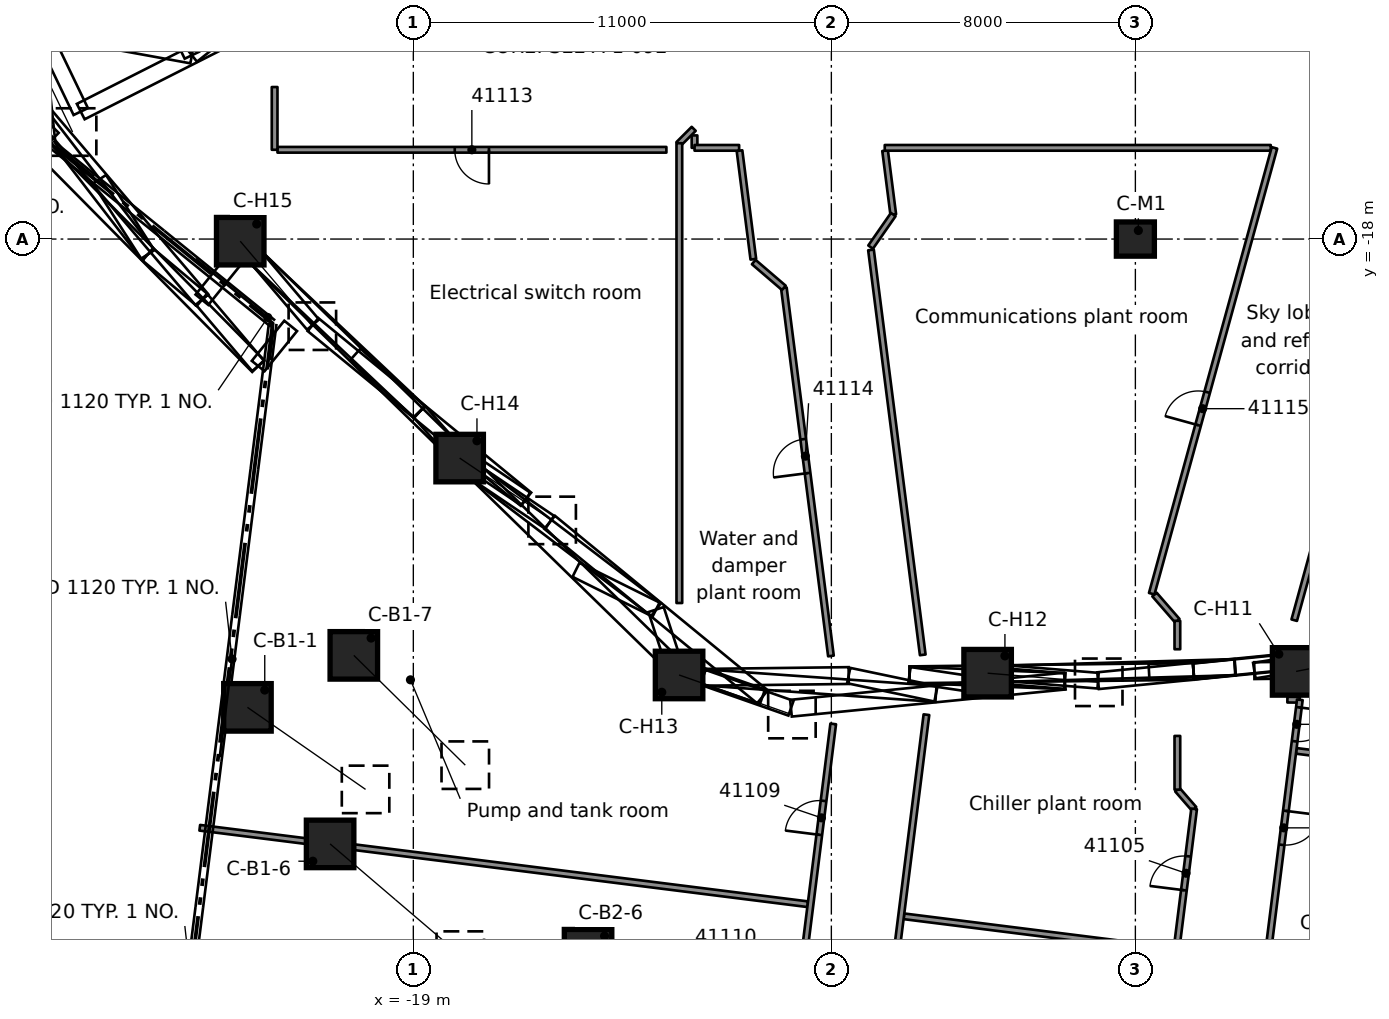
"""IFC4 building model, lengths in metres.
Left out: names, types, materials, properties, quantities, classifications, styles, units other than length and angle.
Written with IfcOpenShell. Run it as: python <this file> out.ifc"""

import sys

from ifc_helpers import new_model, si_unit, direction, frame, frame_2d, origin, origin_2d, place, context, subcontext, project, spatial, rectangle, extrude, element, fill, save


model = new_model("IFC4")
c1 = context("Model", 3, precision=1e-05, world=origin(), true_north=direction((0.0, 1.0)))
c2 = subcontext(c1, "Body", "Model", "MODEL_VIEW")
j1 = project(units=[si_unit("LENGTHUNIT", "METRE"), si_unit("PLANEANGLEUNIT", "RADIAN")], contexts=[c1])
p1 = place(None, origin())
s1 = spatial("IfcSite", under=j1, at=p1, CompositionType="ELEMENT")
p2 = place(p1, origin())
s2 = spatial("IfcBuilding", under=s1, at=p2, CompositionType="ELEMENT")
p3 = place(p2, frame((0.0, 0.0, 206.1)))
s3 = spatial("IfcBuildingStorey", under=s2, at=p3, CompositionType="ELEMENT", Elevation=206.1)
p4 = place(p3, frame((-23.365, -30.322, 0.46), z_axis=(0.604547981871, -0.419954265804, 0.676875285594), x_axis=(0.570514289854, 0.821287674979, 0.0)))
e1 = element("IfcColumn", 1, at=p4, inside=s3, PredefinedType="COLUMN", context=c2, shape_type="SweptSolid", body=[
    extrude(rectangle(XDim=1.25, YDim=1.25, at=origin_2d()), origin(), (0.0, 0.0, 1.0), 5.141),
])
p5 = place(p3, frame((-21.19, -33.915, 0.499), z_axis=(0.60682574595, -0.518264559624, 0.602631197574), x_axis=(0.649438201848, 0.76041437518, 0.0)))
e2 = element("IfcColumn", 2, at=p5, inside=s3, PredefinedType="COLUMN", context=c2, shape_type="SweptSolid", body=[
    extrude(rectangle(XDim=1.25, YDim=1.25, at=origin_2d()), origin(), (0.0, 0.0, 1.0), 5.646),
])
p6 = place(p3, frame((-20.566, -28.954, 0.479), z_axis=(0.546625765271, -0.538435251848, 0.641317201009), x_axis=(0.701749238888, 0.712424035052, 0.0)))
e3 = element("IfcColumn", 3, at=p6, inside=s3, PredefinedType="COLUMN", context=c2, shape_type="SweptSolid", body=[
    extrude(rectangle(XDim=1.25, YDim=1.25, at=origin_2d()), origin(), (0.0, 0.0, 1.0), 5.365),
])
p7 = place(p3, frame((-14.402, -36.791, 0.489), z_axis=(0.668536196843, -0.40762020421, 0.622016979375), x_axis=(0.520585249555, 0.853809696564, 0.0)))
e4 = element("IfcColumn", 4, at=p7, inside=s3, PredefinedType="COLUMN", context=c2, shape_type="SweptSolid", body=[
    extrude(rectangle(XDim=1.25, YDim=1.25, at=origin_2d()), origin(), (0.0, 0.0, 1.0), 5.5),
])
p8 = place(p3, frame((4.23, -29.376, 0.394), z_axis=(0.618915614767, 0.120561844769, 0.776149665582), x_axis=(-0.191201472119, 0.981550812266, 0.0)))
e5 = element("IfcColumn", 5, at=p8, inside=s3, PredefinedType="COLUMN", context=c2, shape_type="SweptSolid", body=[
    extrude(rectangle(XDim=1.25, YDim=1.25, at=origin_2d()), origin(), (0.0, 0.0, 1.0), 4.654),
])
p9 = place(p3, frame((-3.888, -29.423, 0.394), z_axis=(0.628357788529, -0.051576127766, 0.776212852663), x_axis=(0.081805717627, 0.99664829532, 0.0)))
e6 = element("IfcColumn", 6, at=p9, inside=s3, PredefinedType="COLUMN", context=c2, shape_type="SweptSolid", body=[
    extrude(rectangle(XDim=1.25, YDim=1.25, at=origin_2d()), origin(), (0.0, 0.0, 1.0), 4.653),
])
p10 = place(p3, frame((-12.007, -29.47, 0.413), z_axis=(0.623513084536, -0.21882689292, 0.750563937548), x_axis=(0.331155585117, 0.943576164623, 0.0)))
e7 = element("IfcColumn", 7, at=p10, inside=s3, PredefinedType="COLUMN", context=c2, shape_type="SweptSolid", body=[
    extrude(rectangle(XDim=1.25, YDim=1.25, at=origin_2d()), origin(), (0.0, 0.0, 1.0), 4.762),
])
p11 = place(p3, frame((-17.781, -23.763, 0.394), z_axis=(0.523026204983, -0.352426283358, 0.776040787394), x_axis=(0.558801233735, 0.829301622557, 0.0)))
e8 = element("IfcColumn", 8, at=p11, inside=s3, PredefinedType="COLUMN", context=c2, shape_type="SweptSolid", body=[
    extrude(rectangle(XDim=1.25, YDim=1.25, at=origin_2d()), origin(), (0.0, 0.0, 1.0), 4.654),
])
p12 = place(p3, frame((-23.555, -18.056, 0.394), z_axis=(0.407867599836, -0.480742322781, 0.776228600408), x_axis=(0.762536504129, 0.646945190778, 0.0)))
e9 = element("IfcColumn", 9, at=p12, inside=s3, PredefinedType="COLUMN", context=c2, shape_type="SweptSolid", body=[
    extrude(rectangle(XDim=1.25, YDim=1.25, at=origin_2d()), origin(), (0.0, 0.0, 1.0), 4.653),
])
p13 = place(p3, frame((-29.329, -12.349, 0.413), z_axis=(0.286274556016, -0.5954182598, 0.750682339258), x_axis=(0.901243098623, 0.433313832209, 0.0)))
e10 = element("IfcColumn", 10, at=p13, inside=s3, PredefinedType="COLUMN", context=c2, shape_type="SweptSolid", body=[
    extrude(rectangle(XDim=1.25, YDim=1.25, at=origin_2d()), origin(), (0.0, 0.0, 1.0), 4.761),
])
p14 = place(p3, frame((0.0, -18.0, 0.0), z_axis=(0.0, 0.0, 1.0), x_axis=(1.0, 0.0, 0.0)))
e11 = element("IfcColumn", 11, at=p14, inside=s3, PredefinedType="COLUMN", context=c2, shape_type="SweptSolid", body=[
    extrude(rectangle(XDim=1.0, YDim=0.9, at=origin_2d()), origin(), (0.0, 0.0, 1.0), 4.4),
])
p15 = place(p3, frame((-11.601, -15.273, 0.0), z_axis=(0.0, 0.0, 1.0), x_axis=(0.002985061327, -0.999995544695, 0.0)))
e12 = element("IfcWall", 12, at=p15, inside=s3, PredefinedType="PARTITIONING", context=c2, shape_type="SweptSolid", body=[
    extrude(rectangle(XDim=0.327, YDim=0.15, at=frame_2d((0.164, 0.0))), origin(), (0.0, 0.0, 1.0), 3.98),
])
p16 = place(p3, frame((-10.417, -15.674, 0.0), z_axis=(0.0, 0.0, 1.0), x_axis=(0.126392298822, -0.991980335893, 0.0)))
e13 = element("IfcWall", 13, at=p16, inside=s3, PredefinedType="PARTITIONING", context=c2, shape_type="SweptSolid", body=[
    extrude(rectangle(XDim=2.88, YDim=0.15, at=frame_2d((1.44, 0.0))), origin(), (0.0, 0.0, 1.0), 3.98),
])
p17 = place(p3, frame((-8.011, -28.97, 0.0), z_axis=(0.0, 0.0, 1.0), x_axis=(-0.126883648169, 0.991917607378, 0.0)))
e14 = element("IfcWall", 14, at=p17, inside=s3, PredefinedType="PARTITIONING", context=c2, shape_type="SweptSolid", body=[
    extrude(rectangle(XDim=9.765, YDim=0.15, at=frame_2d((4.882, 0.0))), origin(), (0.0, 0.0, 1.0), 3.98),
])
p18 = place(p17, frame((4.85, 0.0, 0.0)))
e15 = element("IfcOpeningElement", 15, at=p18, cuts=e14, PredefinedType="OPENING", context=c2, shape_type="SweptSolid", body=[
    extrude(rectangle(XDim=0.9, YDim=2.1, at=frame_2d((0.45, 1.05))), frame((0.0, 0.085, 0.0), z_axis=(0.0, -1.0, 0.0), x_axis=(1.0, 0.0, 0.0)), (0.0, 0.0, 1.0), 0.17),
])
p19 = place(p3, frame((-6.957, -18.286, 0.0), z_axis=(0.0, 0.0, 1.0), x_axis=(0.126800802757, -0.991928201242, 0.0)))
e16 = element("IfcWall", 16, at=p19, inside=s3, PredefinedType="PARTITIONING", context=c2, shape_type="SweptSolid", body=[
    extrude(rectangle(XDim=10.742, YDim=0.15, at=frame_2d((5.371, 0.0))), origin(), (0.0, 0.0, 1.0), 3.98),
])
p20 = place(p3, frame((-6.586, -15.674, 0.0), z_axis=(0.0, 0.0, 1.0), x_axis=(0.126782694837, -0.991930515858, 0.0)))
e17 = element("IfcWall", 17, at=p20, inside=s3, PredefinedType="PARTITIONING", context=c2, shape_type="SweptSolid", body=[
    extrude(rectangle(XDim=1.695, YDim=0.15, at=frame_2d((0.847, 0.0))), origin(), (0.0, 0.0, 1.0), 3.98),
])
p21 = place(p3, frame((0.502, -27.352, 0.0), z_axis=(0.0, 0.0, 1.0), x_axis=(0.656507674583, -0.754319344319, 0.0)))
e18 = element("IfcWall", 18, at=p21, inside=s3, PredefinedType="PARTITIONING", context=c2, shape_type="SweptSolid", body=[
    extrude(rectangle(XDim=0.918, YDim=0.15, at=frame_2d((0.459, 0.0))), origin(), (0.0, 0.0, 1.0), 3.98),
])
p22 = place(p3, frame((-24.62, -33.49, 0.0), z_axis=(0.0, 0.0, 1.0), x_axis=(0.992184418995, -0.124780121428, 0.0)))
e19 = element("IfcWall", 19, at=p22, inside=s3, PredefinedType="PARTITIONING", context=c2, shape_type="SweptSolid", body=[
    extrude(rectangle(XDim=16.124, YDim=0.15, at=frame_2d((8.062, 0.0))), origin(), (0.0, 0.0, 1.0), 3.98),
])
p23 = place(p3, frame((-6.091, -35.82, 0.0), z_axis=(0.0, 0.0, 1.0), x_axis=(0.992189898708, -0.124736541969, 0.0)))
e20 = element("IfcWall", 20, at=p23, inside=s3, PredefinedType="PARTITIONING", context=c2, shape_type="SweptSolid", body=[
    extrude(rectangle(XDim=7.15, YDim=0.15, at=frame_2d((3.575, 0.0))), origin(), (0.0, 0.0, 1.0), 3.98),
])
p24 = place(p3, frame((4.232, -31.467, 0.0), z_axis=(0.0, 0.0, 1.0), x_axis=(0.992187839052, -0.124752923961, 0.0)))
e21 = element("IfcWall", 21, at=p24, inside=s3, PredefinedType="PARTITIONING", context=c2, shape_type="SweptSolid", body=[
    extrude(rectangle(XDim=15.271, YDim=0.15, at=frame_2d((7.635, 0.0))), origin(), (0.0, 0.0, 1.0), 3.98),
])
p25 = place(p3, frame((1.105, -32.488, 0.0), z_axis=(0.0, 0.0, 1.0), x_axis=(0.657060992412, -0.753837417651, 0.0)))
e22 = element("IfcWall", 22, at=p25, inside=s3, PredefinedType="PARTITIONING", context=c2, shape_type="SweptSolid", body=[
    extrude(rectangle(XDim=0.671, YDim=0.15, at=frame_2d((0.335, 0.0))), origin(), (0.0, 0.0, 1.0), 3.98),
])
p26 = place(p3, frame((4.0, -30.119, 0.0), z_axis=(0.0, 0.0, 1.0), x_axis=(0.999918931432, -0.012733050063, 0.0)))
e23 = element("IfcWall", 23, at=p26, inside=s3, PredefinedType="PARTITIONING", context=c2, shape_type="SweptSolid", body=[
    extrude(rectangle(XDim=0.326, YDim=0.15, at=frame_2d((0.163, 0.0))), origin(), (0.0, 0.0, 1.0), 3.98),
])
p27 = place(p3, frame((-12.341, -15.651, 0.0), z_axis=(0.0, 0.0, 1.0), x_axis=(-1.0, 0.0, 0.0)))
e24 = element("IfcWall", 24, at=p27, inside=s3, PredefinedType="PARTITIONING", context=c2, shape_type="SweptSolid", body=[
    extrude(rectangle(XDim=10.234, YDim=0.15, at=frame_2d((5.117, 0.0))), origin(), (0.0, 0.0, 1.0), 3.98),
])
p28 = place(p27, frame((4.669, 0.0, 0.0)))
e25 = element("IfcOpeningElement", 25, at=p28, cuts=e24, PredefinedType="OPENING", context=c2, shape_type="SweptSolid", body=[
    extrude(rectangle(XDim=0.9, YDim=2.1, at=frame_2d((0.45, 1.05))), frame((0.0, 0.085, 0.0), z_axis=(0.0, -1.0, 0.0), x_axis=(1.0, 0.0, 0.0)), (0.0, 0.0, 1.0), 0.17),
])
p29 = place(p3, frame((-11.6, -15.6, 0.0), z_axis=(0.0, 0.0, 1.0), x_axis=(1.0, 0.0, 0.0)))
e26 = element("IfcWall", 26, at=p29, inside=s3, PredefinedType="PARTITIONING", context=c2, shape_type="SweptSolid", body=[
    extrude(rectangle(XDim=1.173, YDim=0.15, at=frame_2d((0.586, 0.0))), origin(), (0.0, 0.0, 1.0), 3.98),
])
p30 = place(p3, frame((-6.595, -15.6, 0.0), z_axis=(0.0, 0.0, 1.0), x_axis=(1.0, 0.0, 0.0)))
e27 = element("IfcWall", 27, at=p30, inside=s3, PredefinedType="PARTITIONING", context=c2, shape_type="SweptSolid", body=[
    extrude(rectangle(XDim=10.157, YDim=0.15, at=frame_2d((5.079, 0.0))), origin(), (0.0, 0.0, 1.0), 3.98),
])
p31 = place(p3, frame((-10.042, -18.605, 0.0), z_axis=(0.0, 0.0, 1.0), x_axis=(0.759207039974, -0.65084919179, 0.0)))
e28 = element("IfcWall", 28, at=p31, inside=s3, PredefinedType="PARTITIONING", context=c2, shape_type="SweptSolid", body=[
    extrude(rectangle(XDim=1.043, YDim=0.15, at=frame_2d((0.521, 0.0))), origin(), (0.0, 0.0, 1.0), 3.98),
])
p32 = place(p3, frame((-6.967, -18.212, 0.0), z_axis=(0.0, 0.0, 1.0), x_axis=(0.570947979782, 0.820986238851, 0.0)))
e29 = element("IfcWall", 29, at=p32, inside=s3, PredefinedType="PARTITIONING", context=c2, shape_type="SweptSolid", body=[
    extrude(rectangle(XDim=1.044, YDim=0.15, at=frame_2d((0.522, 0.0))), origin(), (0.0, 0.0, 1.0), 3.98),
])
p33 = place(p3, frame((-12.025, -15.503, 0.0), z_axis=(0.0, 0.0, 1.0), x_axis=(0.707106781187, 0.707106781187, 0.0)))
e30 = element("IfcWall", 30, at=p33, inside=s3, PredefinedType="PARTITIONING", context=c2, shape_type="SweptSolid", body=[
    extrude(rectangle(XDim=0.57, YDim=0.15, at=frame_2d((0.285, 0.0))), origin(), (0.0, 0.0, 1.0), 3.98),
])
p34 = place(p3, frame((7.603, -15.603, 0.0), z_axis=(0.0, 0.0, 1.0), x_axis=(-0.265604225534, -0.964082151779, 0.0)))
e31 = element("IfcWall", 31, at=p34, inside=s3, PredefinedType="PARTITIONING", context=c2, shape_type="SweptSolid", body=[
    extrude(rectangle(XDim=12.888, YDim=0.15, at=frame_2d((6.444, 0.0))), origin(), (0.0, 0.0, 1.0), 3.98),
])
p35 = place(p34, frame((7.607, 0.0, 0.0)))
e32 = element("IfcOpeningElement", 32, at=p35, cuts=e31, PredefinedType="OPENING", context=c2, shape_type="SweptSolid", body=[
    extrude(rectangle(XDim=0.9, YDim=2.1, at=frame_2d((0.45, 1.05))), frame((0.0, 0.085, 0.0), z_axis=(0.0, -1.0, 0.0), x_axis=(1.0, 0.0, 0.0)), (0.0, 0.0, 1.0), 0.17),
])
p36 = place(p3, frame((0.43, -27.332, 0.0), z_axis=(0.0, 0.0, 1.0), x_axis=(0.265459601419, 0.964121983991, 0.0)))
e33 = element("IfcWall", 33, at=p36, inside=s3, PredefinedType="PARTITIONING", context=c2, shape_type="SweptSolid", body=[
    extrude(rectangle(XDim=12.167, YDim=0.15, at=frame_2d((6.084, 0.0))), origin(), (0.0, 0.0, 1.0), 3.98),
])
p37 = place(p36, frame((4.6, 0.0, 0.0)))
e34 = element("IfcOpeningElement", 34, at=p37, cuts=e33, PredefinedType="OPENING", context=c2, shape_type="SweptSolid", body=[
    extrude(rectangle(XDim=0.9, YDim=2.1, at=frame_2d((0.45, 1.05))), frame((0.0, 0.085, 0.0), z_axis=(0.0, -1.0, 0.0), x_axis=(1.0, 0.0, 0.0)), (0.0, 0.0, 1.0), 0.17),
])
p38 = place(p3, frame((4.328, -30.123, 0.0), z_axis=(0.0, 0.0, 1.0), x_axis=(-0.124803349917, -0.992181497434, 0.0)))
e35 = element("IfcWall", 35, at=p38, inside=s3, PredefinedType="PARTITIONING", context=c2, shape_type="SweptSolid", body=[
    extrude(rectangle(XDim=26.153, YDim=0.15, at=frame_2d((13.076, 0.0))), origin(), (0.0, 0.0, 1.0), 3.98),
])
p39 = place(p38, frame((2.946, 0.0, 0.0)))
e36 = element("IfcOpeningElement", 36, at=p39, cuts=e35, PredefinedType="OPENING", context=c2, shape_type="SweptSolid", body=[
    extrude(rectangle(XDim=0.9, YDim=2.1, at=frame_2d((0.45, 1.05))), frame((0.0, 0.085, 0.0), z_axis=(0.0, -1.0, 0.0), x_axis=(1.0, 0.0, 0.0)), (0.0, 0.0, 1.0), 0.17),
])
p40 = place(p38, frame((9.803, 0.0, 0.0)))
e37 = element("IfcOpeningElement", 37, at=p40, cuts=e35, PredefinedType="OPENING", context=c2, shape_type="SweptSolid", body=[
    extrude(rectangle(XDim=0.9, YDim=2.1, at=frame_2d((0.45, 1.05))), frame((0.0, 0.085, 0.0), z_axis=(0.0, -1.0, 0.0), x_axis=(1.0, 0.0, 0.0)), (0.0, 0.0, 1.0), 0.17),
])
p41 = place(p38, frame((16.102, 0.0, 0.0)))
e38 = element("IfcOpeningElement", 38, at=p41, cuts=e35, PredefinedType="OPENING", context=c2, shape_type="SweptSolid", body=[
    extrude(rectangle(XDim=0.9, YDim=2.1, at=frame_2d((0.45, 1.05))), frame((0.0, 0.085, 0.0), z_axis=(0.0, -1.0, 0.0), x_axis=(1.0, 0.0, 0.0)), (0.0, 0.0, 1.0), 0.17),
])
p42 = place(p38, frame((23.052, 0.0, 0.0)))
e39 = element("IfcOpeningElement", 39, at=p42, cuts=e35, PredefinedType="OPENING", context=c2, shape_type="SweptSolid", body=[
    extrude(rectangle(XDim=0.9, YDim=2.1, at=frame_2d((0.45, 1.05))), frame((0.0, 0.085, 0.0), z_axis=(0.0, -1.0, 0.0), x_axis=(1.0, 0.0, 0.0)), (0.0, 0.0, 1.0), 0.17),
])
p43 = place(p38, frame((0.2, 0.0, 0.0)))
e40 = element("IfcOpeningElement", 40, at=p43, cuts=e35, PredefinedType="OPENING", context=c2, shape_type="SweptSolid", body=[
    extrude(rectangle(XDim=0.9, YDim=2.1, at=frame_2d((0.45, 1.05))), frame((0.0, 0.085, 0.0), z_axis=(0.0, -1.0, 0.0), x_axis=(1.0, 0.0, 0.0)), (0.0, 0.0, 1.0), 0.17),
])
p44 = place(p3, frame((-0.668, -50.6, 0.0), z_axis=(0.0, 0.0, 1.0), x_axis=(0.124761144716, 0.99218680538, 0.0)))
e41 = element("IfcWall", 41, at=p44, inside=s3, PredefinedType="PARTITIONING", context=c2, shape_type="SweptSolid", body=[
    extrude(rectangle(XDim=17.745, YDim=0.15, at=frame_2d((8.873, 0.0))), origin(), (0.0, 0.0, 1.0), 3.98),
])
p45 = place(p44, frame((15.588, 0.0, 0.0)))
e42 = element("IfcOpeningElement", 42, at=p45, cuts=e41, PredefinedType="OPENING", context=c2, shape_type="SweptSolid", body=[
    extrude(rectangle(XDim=0.9, YDim=2.1, at=frame_2d((0.45, 1.05))), frame((0.0, 0.085, 0.0), z_axis=(0.0, -1.0, 0.0), x_axis=(1.0, 0.0, 0.0)), (0.0, 0.0, 1.0), 0.17),
])
p46 = place(p44, frame((3.85, 0.0, 0.0)))
e43 = element("IfcOpeningElement", 43, at=p46, cuts=e41, PredefinedType="OPENING", context=c2, shape_type="SweptSolid", body=[
    extrude(rectangle(XDim=0.9, YDim=2.1, at=frame_2d((0.45, 1.05))), frame((0.0, 0.085, 0.0), z_axis=(0.0, -1.0, 0.0), x_axis=(1.0, 0.0, 0.0)), (0.0, 0.0, 1.0), 0.17),
])
p47 = place(p3, frame((-5.498, -30.515, 0.0), z_axis=(0.0, 0.0, 1.0), x_axis=(-0.12483829345, -0.992177101373, 0.0)))
e44 = element("IfcWall", 44, at=p47, inside=s3, PredefinedType="PARTITIONING", context=c2, shape_type="SweptSolid", body=[
    extrude(rectangle(XDim=21.837, YDim=0.15, at=frame_2d((10.918, 0.0))), origin(), (0.0, 0.0, 1.0), 3.98),
])
p48 = place(p47, frame((8.188, 0.0, 0.0)))
e45 = element("IfcOpeningElement", 45, at=p48, cuts=e44, PredefinedType="OPENING", context=c2, shape_type="SweptSolid", body=[
    extrude(rectangle(XDim=0.9, YDim=2.1, at=frame_2d((0.45, 1.05))), frame((0.0, 0.085, 0.0), z_axis=(0.0, -1.0, 0.0), x_axis=(1.0, 0.0, 0.0)), (0.0, 0.0, 1.0), 0.17),
])
p49 = place(p47, frame((20.187, 0.0, 0.0)))
e46 = element("IfcOpeningElement", 46, at=p49, cuts=e44, PredefinedType="OPENING", context=c2, shape_type="SweptSolid", body=[
    extrude(rectangle(XDim=0.9, YDim=2.1, at=frame_2d((0.45, 1.05))), frame((0.0, 0.085, 0.0), z_axis=(0.0, -1.0, 0.0), x_axis=(1.0, 0.0, 0.0)), (0.0, 0.0, 1.0), 0.17),
])
p50 = place(p3, frame((-10.294, -49.402, 0.0), z_axis=(0.0, 0.0, 1.0), x_axis=(0.124690335959, 0.992195706561, 0.0)))
e47 = element("IfcWall", 47, at=p50, inside=s3, PredefinedType="PARTITIONING", context=c2, shape_type="SweptSolid", body=[
    extrude(rectangle(XDim=18.791, YDim=0.15, at=frame_2d((9.396, 0.0))), origin(), (0.0, 0.0, 1.0), 3.98),
])
p51 = place(p50, frame((15.85, 0.0, 0.0)))
e48 = element("IfcOpeningElement", 48, at=p51, cuts=e47, PredefinedType="OPENING", context=c2, shape_type="SweptSolid", body=[
    extrude(rectangle(XDim=0.9, YDim=2.1, at=frame_2d((0.45, 1.05))), frame((0.0, 0.085, 0.0), z_axis=(0.0, -1.0, 0.0), x_axis=(1.0, 0.0, 0.0)), (0.0, 0.0, 1.0), 0.17),
])
p52 = place(p50, frame((11.05, 0.0, 0.0)))
e49 = element("IfcOpeningElement", 49, at=p52, cuts=e47, PredefinedType="OPENING", context=c2, shape_type="SweptSolid", body=[
    extrude(rectangle(XDim=0.9, YDim=2.1, at=frame_2d((0.45, 1.05))), frame((0.0, 0.085, 0.0), z_axis=(0.0, -1.0, 0.0), x_axis=(1.0, 0.0, 0.0)), (0.0, 0.0, 1.0), 0.17),
])
p53 = place(p50, frame((3.85, 0.0, 0.0)))
e50 = element("IfcOpeningElement", 50, at=p53, cuts=e47, PredefinedType="OPENING", context=c2, shape_type="SweptSolid", body=[
    extrude(rectangle(XDim=0.9, YDim=2.1, at=frame_2d((0.45, 1.05))), frame((0.0, 0.085, 0.0), z_axis=(0.0, -1.0, 0.0), x_axis=(1.0, 0.0, 0.0)), (0.0, 0.0, 1.0), 0.17),
])
p54 = place(p3, frame((1.105, -32.488, 0.0), z_axis=(0.0, 0.0, 1.0), x_axis=(0.0, 1.0, 0.0)))
e51 = element("IfcWall", 51, at=p54, inside=s3, PredefinedType="PARTITIONING", context=c2, shape_type="SweptSolid", body=[
    extrude(rectangle(XDim=1.414, YDim=0.15, at=frame_2d((0.707, 0.0))), origin(), (0.0, 0.0, 1.0), 3.98),
])
p55 = place(p3, frame((1.105, -28.793, 0.0), z_axis=(0.0, 0.0, 1.0), x_axis=(0.0, 1.0, 0.0)))
e52 = element("IfcWall", 52, at=p55, inside=s3, PredefinedType="PARTITIONING", context=c2, shape_type="SweptSolid", body=[
    extrude(rectangle(XDim=0.748, YDim=0.15, at=frame_2d((0.374, 0.0))), origin(), (0.0, 0.0, 1.0), 3.98),
])
p56 = place(p3, frame((-12.0, -27.577, 0.0), z_axis=(0.0, 0.0, 1.0), x_axis=(0.0, 1.0, 0.0)))
e53 = element("IfcWall", 53, at=p56, inside=s3, PredefinedType="PARTITIONING", context=c2, shape_type="SweptSolid", body=[
    extrude(rectangle(XDim=12.099, YDim=0.15, at=frame_2d((6.049, 0.0))), origin(), (0.0, 0.0, 1.0), 3.98),
])
p57 = place(p3, frame((-22.65, -15.651, 0.0), z_axis=(0.0, 0.0, 1.0), x_axis=(0.0, 1.0, 0.0)))
e54 = element("IfcWall", 54, at=p57, inside=s3, PredefinedType="PARTITIONING", context=c2, shape_type="SweptSolid", body=[
    extrude(rectangle(XDim=1.651, YDim=0.15, at=frame_2d((0.825, 0.0))), origin(), (0.0, 0.0, 1.0), 3.98),
])
p58 = place(p39, origin())
e55 = element("IfcDoor", 55, at=p58, inside=s3, OperationType="SINGLE_SWING_LEFT", PredefinedType="DOOR", context=c2, shape_type="SweptSolid", body=[
    extrude(rectangle(XDim=0.9, YDim=2.1, at=frame_2d((0.45, 1.05))), frame((0.0, 0.025, 0.0), z_axis=(0.0, -1.0, 0.0), x_axis=(1.0, 0.0, 0.0)), (0.0, 0.0, 1.0), 0.05),
])
fill(e36, e55)
p59 = place(p45, origin())
e56 = element("IfcDoor", 56, at=p59, inside=s3, OperationType="SINGLE_SWING_RIGHT", PredefinedType="DOOR", context=c2, shape_type="SweptSolid", body=[
    extrude(rectangle(XDim=0.9, YDim=2.1, at=frame_2d((0.45, 1.05))), frame((0.0, 0.025, 0.0), z_axis=(0.0, -1.0, 0.0), x_axis=(1.0, 0.0, 0.0)), (0.0, 0.0, 1.0), 0.05),
])
fill(e42, e56)
p60 = place(p51, origin())
e57 = element("IfcDoor", 57, at=p60, inside=s3, OperationType="SINGLE_SWING_RIGHT", PredefinedType="DOOR", context=c2, shape_type="SweptSolid", body=[
    extrude(rectangle(XDim=0.9, YDim=2.1, at=frame_2d((0.45, 1.05))), frame((0.0, 0.025, 0.0), z_axis=(0.0, -1.0, 0.0), x_axis=(1.0, 0.0, 0.0)), (0.0, 0.0, 1.0), 0.05),
])
fill(e48, e57)
p61 = place(p28, origin())
e58 = element("IfcDoor", 58, at=p61, inside=s3, OperationType="SINGLE_SWING_RIGHT", PredefinedType="DOOR", context=c2, shape_type="SweptSolid", body=[
    extrude(rectangle(XDim=0.9, YDim=2.1, at=frame_2d((0.45, 1.05))), frame((0.0, 0.025, 0.0), z_axis=(0.0, -1.0, 0.0), x_axis=(1.0, 0.0, 0.0)), (0.0, 0.0, 1.0), 0.05),
])
fill(e25, e58)
p62 = place(p18, origin())
e59 = element("IfcDoor", 59, at=p62, inside=s3, OperationType="SINGLE_SWING_RIGHT", PredefinedType="DOOR", context=c2, shape_type="SweptSolid", body=[
    extrude(rectangle(XDim=0.9, YDim=2.1, at=frame_2d((0.45, 1.05))), frame((0.0, 0.025, 0.0), z_axis=(0.0, -1.0, 0.0), x_axis=(1.0, 0.0, 0.0)), (0.0, 0.0, 1.0), 0.05),
])
fill(e15, e59)
p63 = place(p37, origin())
e60 = element("IfcDoor", 60, at=p63, inside=s3, OperationType="SINGLE_SWING_LEFT", PredefinedType="DOOR", context=c2, shape_type="SweptSolid", body=[
    extrude(rectangle(XDim=0.9, YDim=2.1, at=frame_2d((0.45, 1.05))), frame((0.0, 0.025, 0.0), z_axis=(0.0, -1.0, 0.0), x_axis=(1.0, 0.0, 0.0)), (0.0, 0.0, 1.0), 0.05),
])
fill(e34, e60)
p64 = place(p43, origin())
e61 = element("IfcDoor", 61, at=p64, inside=s3, OperationType="SINGLE_SWING_LEFT", PredefinedType="DOOR", context=c2, shape_type="SweptSolid", body=[
    extrude(rectangle(XDim=0.9, YDim=2.1, at=frame_2d((0.45, 1.05))), frame((0.0, 0.025, 0.0), z_axis=(0.0, -1.0, 0.0), x_axis=(1.0, 0.0, 0.0)), (0.0, 0.0, 1.0), 0.05),
])
fill(e40, e61)
save(model, sys.argv[1])
